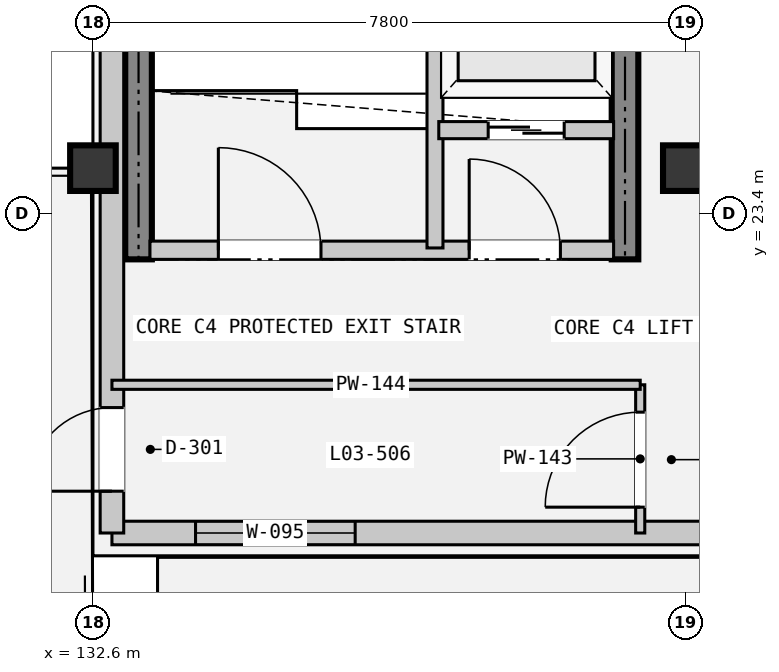
"""IFC4 building model, lengths in metres.
Left out: names, types, materials, properties, quantities, classifications, styles, units other than length and angle.
Written with IfcOpenShell. Run it as: python <this file> out.ifc"""

import sys

from ifc_helpers import new_model, si_unit, direction, frame, frame_2d, origin, origin_2d, place, context, subcontext, project, spatial, rectangle, extrude, element, fill, save


model = new_model("IFC4")
c1 = context("Model", 3, precision=1e-05, world=origin(), true_north=direction((0.0, 1.0)))
c2 = subcontext(c1, "Body", "Model", "MODEL_VIEW")
j1 = project(units=[si_unit("LENGTHUNIT", "METRE"), si_unit("PLANEANGLEUNIT", "RADIAN")], contexts=[c1])
p1 = place(None, origin())
s1 = spatial("IfcSite", under=j1, at=p1, CompositionType="ELEMENT")
p2 = place(p1, origin())
s2 = spatial("IfcBuilding", under=s1, at=p2, CompositionType="ELEMENT")
p3 = place(p2, frame((0.0, 0.0, 15.0)))
s3 = spatial("IfcBuildingStorey", under=s2, at=p3, CompositionType="ELEMENT", Elevation=15.0)
for number, where, z_axis, x_axis in (
    (1, (132.6, 24.0, 0.0), (0.0, 0.0, 1.0), (1.0, 0.0, 0.0)),
    (2, (140.4, 24.0, 0.0), (0.0, 0.0, 1.0), (1.0, 0.0, 0.0)),
):
    element("IfcColumn", number, at=place(p3, frame(where, z_axis=z_axis, x_axis=x_axis)), inside=s3, PredefinedType="COLUMN", context=c2, shape_type="SweptSolid", body=[
        extrude(rectangle(XDim=0.6, YDim=0.6, at=origin_2d()), origin(), (0.0, 0.0, 1.0), 4.8),
    ])
for number, where, z_axis, x_axis in (
    (3, (133.2, 22.8, 0.0), (0.0, 0.0, 1.0), (0.0, 1.0, 0.0)),
    (4, (139.6, 22.8, 0.0), (0.0, 0.0, 1.0), (0.0, 1.0, 0.0)),
):
    element("IfcWall", number, at=place(p3, frame(where, z_axis=z_axis, x_axis=x_axis)), inside=s3, PredefinedType="SHEAR", context=c2, shape_type="SweptSolid", body=[
        extrude(rectangle(XDim=8.6, YDim=0.35, at=frame_2d((4.3, 0.0))), origin(), (0.0, 0.0, 1.0), 4.8),
    ])
p4 = place(p3, frame((132.85, 19.2, 0.0), z_axis=(0.0, 0.0, 1.0), x_axis=(1.0, 0.0, 0.0)))
e5 = element("IfcWall", 5, at=p4, inside=s3, PredefinedType="SOLIDWALL", context=c2, shape_type="SweptSolid", body=[
    extrude(rectangle(XDim=24.05, YDim=0.31, at=frame_2d((12.025, 0.0))), origin(), (0.0, 0.0, 1.0), 3.87),
])
p5 = place(p4, frame((1.1, 0.0, 0.78)))
e6 = element("IfcOpeningElement", 6, at=p5, cuts=e5, PredefinedType="OPENING", context=c2, shape_type="SweptSolid", body=[
    extrude(rectangle(XDim=2.1, YDim=2.6, at=frame_2d((1.05, 1.3))), frame((0.0, 0.165, 0.0), z_axis=(0.0, -1.0, 0.0), x_axis=(1.0, 0.0, 0.0)), (0.0, 0.0, 1.0), 0.33),
])
p6 = place(p4, frame((8.9, 0.0, 0.78)))
e7 = element("IfcOpeningElement", 7, at=p6, cuts=e5, PredefinedType="OPENING", context=c2, shape_type="SweptSolid", body=[
    extrude(rectangle(XDim=2.1, YDim=2.6, at=frame_2d((1.05, 1.3))), frame((0.0, 0.165, 0.0), z_axis=(0.0, -1.0, 0.0), x_axis=(1.0, 0.0, 0.0)), (0.0, 0.0, 1.0), 0.33),
])
p7 = place(p4, frame((12.8, 0.0, 0.78)))
e8 = element("IfcOpeningElement", 8, at=p7, cuts=e5, PredefinedType="OPENING", context=c2, shape_type="SweptSolid", body=[
    extrude(rectangle(XDim=2.1, YDim=2.6, at=frame_2d((1.05, 1.3))), frame((0.0, 0.165, 0.0), z_axis=(0.0, -1.0, 0.0), x_axis=(1.0, 0.0, 0.0)), (0.0, 0.0, 1.0), 0.33),
])
p8 = place(p4, frame((16.7, 0.0, 0.78)))
e9 = element("IfcOpeningElement", 9, at=p8, cuts=e5, PredefinedType="OPENING", context=c2, shape_type="SweptSolid", body=[
    extrude(rectangle(XDim=2.1, YDim=2.6, at=frame_2d((1.05, 1.3))), frame((0.0, 0.165, 0.0), z_axis=(0.0, -1.0, 0.0), x_axis=(1.0, 0.0, 0.0)), (0.0, 0.0, 1.0), 0.33),
])
p9 = place(p3, frame((132.85, 19.2, 0.0), z_axis=(0.0, 0.0, 1.0), x_axis=(0.0, 1.0, 0.0)))
e10 = element("IfcWall", 10, at=p9, inside=s3, PredefinedType="SOLIDWALL", context=c2, shape_type="SweptSolid", body=[
    extrude(rectangle(XDim=12.8, YDim=0.31, at=frame_2d((6.4, 0.0))), origin(), (0.0, 0.0, 1.0), 3.87),
])
p10 = place(p9, frame((0.55, 0.0, 0.0)))
e11 = element("IfcOpeningElement", 11, at=p10, cuts=e10, PredefinedType="OPENING", context=c2, shape_type="SweptSolid", body=[
    extrude(rectangle(XDim=1.1, YDim=2.2, at=frame_2d((0.55, 1.1))), frame((0.0, 0.165, 0.0), z_axis=(0.0, -1.0, 0.0), x_axis=(1.0, 0.0, 0.0)), (0.0, 0.0, 1.0), 0.33),
])
p11 = place(p3, frame((133.35, 22.92, 0.0), z_axis=(0.0, 0.0, 1.0), x_axis=(1.0, 0.0, 0.0)))
e12 = element("IfcWall", 12, at=p11, inside=s3, PredefinedType="PARTITIONING", context=c2, shape_type="SweptSolid", body=[
    extrude(rectangle(XDim=6.1, YDim=0.24, at=frame_2d((3.05, 0.0))), origin(), (0.0, 0.0, 1.0), 3.87),
])
p12 = place(p11, frame((0.9, 0.0, 0.0)))
e13 = element("IfcOpeningElement", 13, at=p12, cuts=e12, PredefinedType="OPENING", context=c2, shape_type="SweptSolid", body=[
    extrude(rectangle(XDim=1.35, YDim=2.2, at=frame_2d((0.675, 1.1))), frame((0.0, 0.13, 0.0), z_axis=(0.0, -1.0, 0.0), x_axis=(1.0, 0.0, 0.0)), (0.0, 0.0, 1.0), 0.26),
])
p13 = place(p11, frame((4.2, 0.0, 0.0)))
e14 = element("IfcOpeningElement", 14, at=p13, cuts=e12, PredefinedType="OPENING", context=c2, shape_type="SweptSolid", body=[
    extrude(rectangle(XDim=1.2, YDim=2.2, at=frame_2d((0.6, 1.1))), frame((0.0, 0.13, 0.0), z_axis=(0.0, -1.0, 0.0), x_axis=(1.0, 0.0, 0.0)), (0.0, 0.0, 1.0), 0.26),
])
p14 = place(p3, frame((137.1, 22.95, 0.0), z_axis=(0.0, 0.0, 1.0), x_axis=(0.0, 1.0, 0.0)))
e15 = element("IfcWall", 15, at=p14, inside=s3, PredefinedType="PARTITIONING", context=c2, shape_type="SweptSolid", body=[
    extrude(rectangle(XDim=8.3, YDim=0.21, at=frame_2d((4.15, 0.0))), origin(), (0.0, 0.0, 1.0), 3.87),
])
p15 = place(p3, frame((137.15, 24.5, 0.0), z_axis=(0.0, 0.0, 1.0), x_axis=(1.0, 0.0, 0.0)))
e16 = element("IfcWall", 16, at=p15, inside=s3, PredefinedType="PARTITIONING", context=c2, shape_type="SweptSolid", body=[
    extrude(rectangle(XDim=2.3, YDim=0.225, at=frame_2d((1.15, 0.0))), origin(), (0.0, 0.0, 1.0), 3.87),
])
p16 = place(p15, frame((0.65, 0.0, 0.0)))
e17 = element("IfcOpeningElement", 17, at=p16, cuts=e16, PredefinedType="OPENING", context=c2, shape_type="SweptSolid", body=[
    extrude(rectangle(XDim=1.0, YDim=2.15, at=frame_2d((0.5, 1.075))), frame((0.0, 0.123, 0.0), z_axis=(0.0, -1.0, 0.0), x_axis=(1.0, 0.0, 0.0)), (0.0, 0.0, 1.0), 0.245),
])
p17 = place(p3, frame((139.8, 19.2, 0.0), z_axis=(0.0, 0.0, 1.0), x_axis=(0.0, 1.0, 0.0)))
e18 = element("IfcWall", 18, at=p17, inside=s3, PredefinedType="PARTITIONING", context=c2, shape_type="SweptSolid", body=[
    extrude(rectangle(XDim=1.95, YDim=0.12, at=frame_2d((0.975, 0.0))), origin(), (0.0, 0.0, 1.0), 3.45),
])
p18 = place(p17, frame((0.34, 0.0, 0.0)))
e19 = element("IfcOpeningElement", 19, at=p18, cuts=e18, PredefinedType="OPENING", context=c2, shape_type="SweptSolid", body=[
    extrude(rectangle(XDim=1.25, YDim=2.2, at=frame_2d((0.625, 1.1))), frame((0.0, 0.07, 0.0), z_axis=(0.0, -1.0, 0.0), x_axis=(1.0, 0.0, 0.0)), (0.0, 0.0, 1.0), 0.14),
])
p19 = place(p3, frame((139.8, 21.15, 0.0), z_axis=(0.0, 0.0, 1.0), x_axis=(-1.0, 0.0, 0.0)))
e20 = element("IfcWall", 20, at=p19, inside=s3, PredefinedType="PARTITIONING", context=c2, shape_type="SweptSolid", body=[
    extrude(rectangle(XDim=6.95, YDim=0.12, at=frame_2d((3.475, 0.0))), origin(), (0.0, 0.0, 1.0), 3.45),
])
p20 = place(p5, origin())
e21 = element("IfcWindow", 21, at=p20, inside=s3, PartitioningType="SINGLE_PANEL", PredefinedType="WINDOW", context=c2, shape_type="SweptSolid", body=[
    extrude(rectangle(XDim=2.1, YDim=2.6, at=frame_2d((1.05, 1.3))), frame((0.0, 0.03, 0.0), z_axis=(0.0, -1.0, 0.0), x_axis=(1.0, 0.0, 0.0)), (0.0, 0.0, 1.0), 0.06),
])
fill(e6, e21)
p21 = place(p10, origin())
e22 = element("IfcDoor", 22, at=p21, inside=s3, OperationType="SINGLE_SWING_LEFT", PredefinedType="DOOR", context=c2, shape_type="SweptSolid", body=[
    extrude(rectangle(XDim=1.1, YDim=2.2, at=frame_2d((0.55, 1.1))), frame((0.0, 0.025, 0.0), z_axis=(0.0, -1.0, 0.0), x_axis=(1.0, 0.0, 0.0)), (0.0, 0.0, 1.0), 0.05),
])
fill(e11, e22)
p22 = place(p12, origin())
e23 = element("IfcDoor", 23, at=p22, inside=s3, OperationType="SINGLE_SWING_LEFT", PredefinedType="DOOR", context=c2, shape_type="SweptSolid", body=[
    extrude(rectangle(XDim=1.35, YDim=2.2, at=frame_2d((0.675, 1.1))), frame((0.0, 0.025, 0.0), z_axis=(0.0, -1.0, 0.0), x_axis=(1.0, 0.0, 0.0)), (0.0, 0.0, 1.0), 0.05),
])
fill(e13, e23)
p23 = place(p13, origin())
e24 = element("IfcDoor", 24, at=p23, inside=s3, OperationType="SINGLE_SWING_RIGHT", PredefinedType="DOOR", context=c2, shape_type="SweptSolid", body=[
    extrude(rectangle(XDim=1.2, YDim=2.2, at=frame_2d((0.6, 1.1))), frame((0.0, 0.025, 0.0), z_axis=(0.0, -1.0, 0.0), x_axis=(1.0, 0.0, 0.0)), (0.0, 0.0, 1.0), 0.05),
])
fill(e14, e24)
p24 = place(p16, origin())
e25 = element("IfcDoor", 25, at=p24, inside=s3, OperationType="SLIDING_TO_LEFT", PredefinedType="DOOR", context=c2, shape_type="SweptSolid", body=[
    extrude(rectangle(XDim=1.0, YDim=2.15, at=frame_2d((0.5, 1.075))), frame((0.0, 0.025, 0.0), z_axis=(0.0, -1.0, 0.0), x_axis=(1.0, 0.0, 0.0)), (0.0, 0.0, 1.0), 0.05),
])
fill(e17, e25)
p25 = place(p18, origin())
e26 = element("IfcDoor", 26, at=p25, inside=s3, OperationType="SINGLE_SWING_RIGHT", PredefinedType="DOOR", context=c2, shape_type="SweptSolid", body=[
    extrude(rectangle(XDim=1.25, YDim=2.2, at=frame_2d((0.625, 1.1))), frame((0.0, 0.025, 0.0), z_axis=(0.0, -1.0, 0.0), x_axis=(1.0, 0.0, 0.0)), (0.0, 0.0, 1.0), 0.05),
])
fill(e19, e26)
save(model, sys.argv[1])
